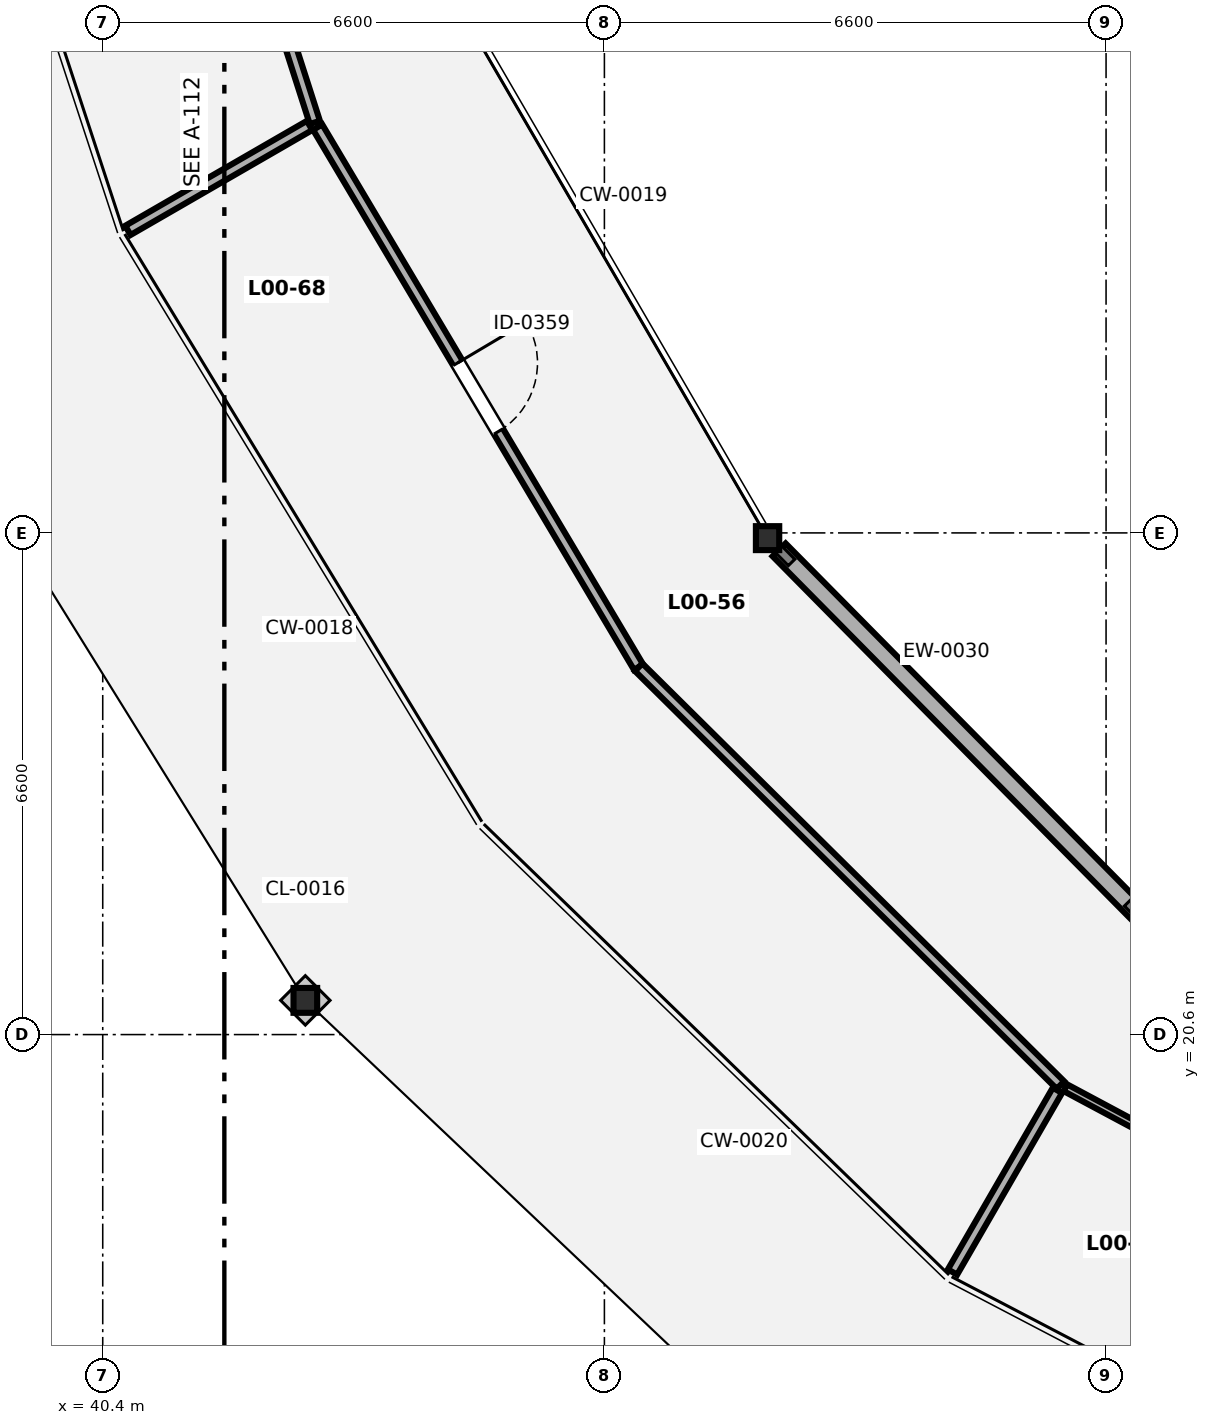
"""IFC4 building model, lengths in metres.
Left out: names, types, materials, properties, quantities, classifications, styles, units other than length and angle.
Written with IfcOpenShell. Run it as: python <this file> out.ifc"""

import sys

from ifc_helpers import new_model, si_unit, direction, frame, frame_2d, origin, origin_2d, place, context, subcontext, project, spatial, rectangle, i_section, extrude, element, fill, save


model = new_model("IFC4")
c1 = context("Model", 3, precision=1e-05, world=origin(), true_north=direction((0.0, 1.0)))
c2 = subcontext(c1, "Body", "Model", "MODEL_VIEW")
j1 = project(units=[si_unit("LENGTHUNIT", "METRE"), si_unit("PLANEANGLEUNIT", "RADIAN")], contexts=[c1])
p1 = place(None, origin())
s1 = spatial("IfcSite", under=j1, at=p1, CompositionType="ELEMENT")
p2 = place(p1, origin())
s2 = spatial("IfcBuilding", under=s1, at=p2, CompositionType="ELEMENT")
p3 = place(p2, origin())
s3 = spatial("IfcBuildingStorey", under=s2, at=p3, CompositionType="ELEMENT", Elevation=0.0)
p4 = place(p3, frame((43.065, 21.05, 0.0), z_axis=(0.0, 0.0, 1.0), x_axis=(1.0, 0.0, 0.0)))
e1 = element("IfcColumn", 1, at=p4, inside=s3, PredefinedType="COLUMN", context=c2, shape_type="SweptSolid", body=[
    extrude(i_section(OverallWidth=0.311, OverallDepth=0.327, WebThickness=0.016, FlangeThickness=0.025, FilletRadius=0.017, at=origin_2d()), origin(), (0.0, 0.0, 1.0), 4.9),
])
p5 = place(p3, frame((49.146, 27.131, 0.0), z_axis=(0.0, 0.0, 1.0), x_axis=(1.0, 0.0, 0.0)))
e2 = element("IfcColumn", 2, at=p5, inside=s3, PredefinedType="COLUMN", context=c2, shape_type="SweptSolid", body=[
    extrude(i_section(OverallWidth=0.307, OverallDepth=0.315, WebThickness=0.012, FlangeThickness=0.019, FilletRadius=0.017, at=origin_2d()), origin(), (0.0, 0.0, 1.0), 4.9),
])
p6 = place(p3, frame((49.299, 26.977, 0.0), z_axis=(0.0, 0.0, 1.0), x_axis=(0.702651385176, -0.711534279505, 0.0)))
e3 = element("IfcWall", 3, at=p6, inside=s3, PredefinedType="SOLIDWALL", context=c2, shape_type="SweptSolid", body=[
    extrude(rectangle(XDim=6.761, YDim=0.24, at=frame_2d((3.381, 0.0))), origin(), (0.0, 0.0, 1.0), 4.35),
])
p7 = place(p3, frame((40.513, 40.945, 0.0), z_axis=(0.0, 0.0, 1.0), x_axis=(0.305493323507, -0.952194218263, 0.0)))
e4 = element("IfcWall", 4, at=p7, inside=s3, PredefinedType="PARTITIONING", context=c2, shape_type="SweptSolid", body=[
    extrude(rectangle(XDim=8.764, YDim=0.14, at=frame_2d((4.382, 0.0))), origin(), (0.0, 0.0, 1.0), 4.7),
])
p8 = place(p7, frame((3.857, 0.0, 0.0)))
e5 = element("IfcOpeningElement", 5, at=p8, cuts=e4, PredefinedType="OPENING", context=c2, shape_type="SweptSolid", body=[
    extrude(rectangle(XDim=1.05, YDim=2.15, at=frame_2d((0.525, 1.075))), frame((0.0, 0.08, 0.0), z_axis=(0.0, -1.0, 0.0), x_axis=(1.0, 0.0, 0.0)), (0.0, 0.0, 1.0), 0.16),
])
p9 = place(p3, frame((43.121, 32.56, 0.0), z_axis=(0.0, 0.0, 1.0), x_axis=(-0.86599702495, -0.500049150362, 0.0)))
e6 = element("IfcWall", 6, at=p9, inside=s3, PredefinedType="PARTITIONING", context=c2, shape_type="SweptSolid", body=[
    extrude(rectangle(XDim=2.76, YDim=0.14, at=frame_2d((1.38, 0.0))), origin(), (0.0, 0.0, 1.0), 4.092),
])
p10 = place(p3, frame((43.227, 32.538, 0.0), z_axis=(0.0, 0.0, 1.0), x_axis=(0.510911392115, -0.859633380812, 0.0)))
e7 = element("IfcWall", 7, at=p10, inside=s3, PredefinedType="PARTITIONING", context=c2, shape_type="SweptSolid", body=[
    extrude(rectangle(XDim=8.264, YDim=0.14, at=frame_2d((4.132, 0.0))), origin(), (0.0, 0.0, 1.0), 4.7),
])
p11 = place(p10, frame((3.607, 0.0, 0.0)))
e8 = element("IfcOpeningElement", 8, at=p11, cuts=e7, PredefinedType="OPENING", context=c2, shape_type="SweptSolid", body=[
    extrude(rectangle(XDim=1.05, YDim=2.15, at=frame_2d((0.525, 1.075))), frame((0.0, 0.08, 0.0), z_axis=(0.0, -1.0, 0.0), x_axis=(1.0, 0.0, 0.0)), (0.0, 0.0, 1.0), 0.16),
])
p12 = place(p3, frame((47.451, 25.433, 0.0), z_axis=(0.0, 0.0, 1.0), x_axis=(0.710427757183, -0.703770134222, 0.0)))
e9 = element("IfcWall", 9, at=p12, inside=s3, PredefinedType="PARTITIONING", context=c2, shape_type="SweptSolid", body=[
    extrude(rectangle(XDim=7.811, YDim=0.14, at=frame_2d((3.905, 0.0))), origin(), (0.0, 0.0, 1.0), 4.7),
])
p13 = place(p3, frame((52.96, 19.866, 0.0), z_axis=(0.0, 0.0, 1.0), x_axis=(-0.499982807329, -0.86603532975, 0.0)))
e10 = element("IfcWall", 10, at=p13, inside=s3, PredefinedType="PARTITIONING", context=c2, shape_type="SweptSolid", body=[
    extrude(rectangle(XDim=2.76, YDim=0.14, at=frame_2d((1.38, 0.0))), origin(), (0.0, 0.0, 1.0), 4.013),
])
p14 = place(p3, frame((53.063, 19.902, 0.0), z_axis=(0.0, 0.0, 1.0), x_axis=(0.881826283139, -0.471574391125, 0.0)))
e11 = element("IfcWall", 11, at=p14, inside=s3, PredefinedType="PARTITIONING", context=c2, shape_type="SweptSolid", body=[
    extrude(rectangle(XDim=7.258, YDim=0.1, at=frame_2d((3.629, 0.0))), origin(), (0.0, 0.0, 1.0), 4.7),
])
p15 = place(p14, frame((3.129, 0.0, 0.0)))
e12 = element("IfcOpeningElement", 12, at=p15, cuts=e11, PredefinedType="OPENING", context=c2, shape_type="SweptSolid", body=[
    extrude(rectangle(XDim=1.0, YDim=2.1, at=frame_2d((0.5, 1.05))), frame((0.0, 0.06, 0.0), z_axis=(0.0, -1.0, 0.0), x_axis=(1.0, 0.0, 0.0)), (0.0, 0.0, 1.0), 0.12),
])
p16 = place(p11, origin())
e13 = element("IfcDoor", 13, at=p16, inside=s3, OperationType="SINGLE_SWING_LEFT", PredefinedType="DOOR", context=c2, shape_type="SweptSolid", body=[
    extrude(rectangle(XDim=1.05, YDim=2.15, at=frame_2d((0.525, 1.075))), frame((0.0, 0.025, 0.0), z_axis=(0.0, -1.0, 0.0), x_axis=(1.0, 0.0, 0.0)), (0.0, 0.0, 1.0), 0.05),
])
fill(e8, e13)
save(model, sys.argv[1])
